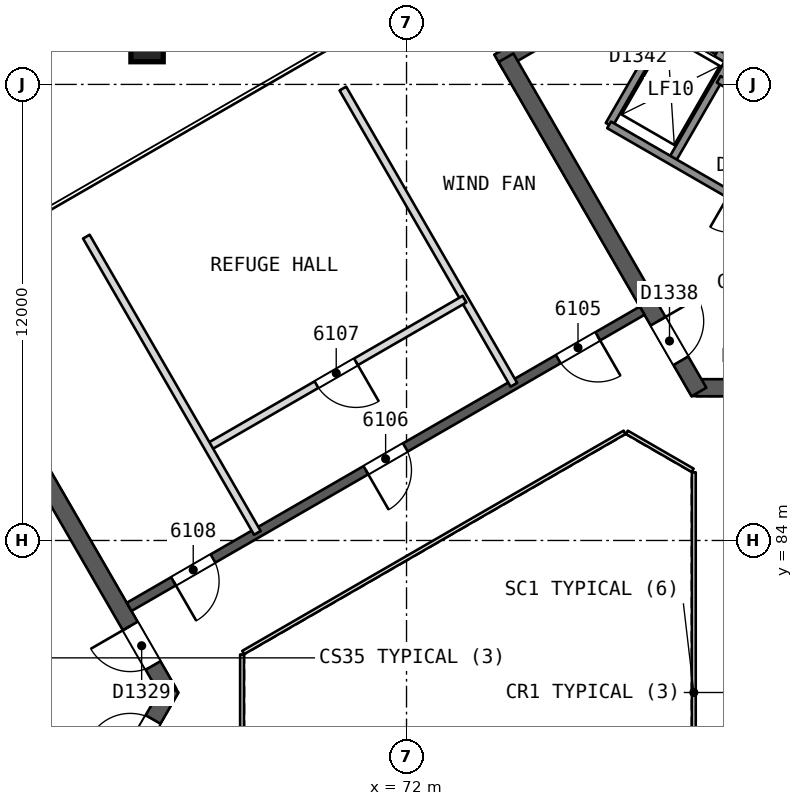
"""IFC4 building model, lengths in metres.
Left out: names, types, materials, properties, quantities, classifications, styles, units other than length and angle.
Written with IfcOpenShell. Run it as: python <this file> out.ifc"""

import sys

from ifc_helpers import new_model, si_unit, direction, frame, frame_2d, origin, origin_2d, place, context, subcontext, project, spatial, rectangle, extrude, element, fill, save


model = new_model("IFC4")
c1 = context("Model", 3, precision=1e-05, world=origin(), true_north=direction((0.0, 1.0)))
c2 = subcontext(c1, "Body", "Model", "MODEL_VIEW")
j1 = project(units=[si_unit("LENGTHUNIT", "METRE"), si_unit("PLANEANGLEUNIT", "RADIAN")], contexts=[c1])
p1 = place(None, origin())
s1 = spatial("IfcSite", under=j1, at=p1, CompositionType="ELEMENT")
p2 = place(p1, origin())
s2 = spatial("IfcBuilding", under=s1, at=p2, CompositionType="ELEMENT")
p3 = place(p2, frame((0.0, 0.0, 246.5)))
s3 = spatial("IfcBuildingStorey", under=s2, at=p3, CompositionType="ELEMENT", Elevation=246.5)
p4 = place(p3, frame((65.74, 80.0, 0.0), z_axis=(0.0, 0.0, 1.0), x_axis=(-0.499991857942, 0.866030104553, 0.0)))
e1 = element("IfcWall", 1, at=p4, inside=s3, PredefinedType="SHEAR", context=c2, shape_type="SweptSolid", body=[
    extrude(rectangle(XDim=10.25, YDim=0.45, at=frame_2d((5.125, 0.0))), origin(), (0.0, 0.0, 1.0), 8.8),
])
p5 = place(p4, frame((0.82, 0.0, 0.0)))
e2 = element("IfcOpeningElement", 2, at=p5, cuts=e1, PredefinedType="OPENING", context=c2, shape_type="SweptSolid", body=[
    extrude(rectangle(XDim=1.2, YDim=2.1, at=frame_2d((0.6, 1.05))), frame((0.0, 0.235, 0.0), z_axis=(0.0, -1.0, 0.0), x_axis=(1.0, 0.0, 0.0)), (0.0, 0.0, 1.0), 0.471),
])
p6 = place(p3, frame((60.728, 71.318, 0.0), z_axis=(0.0, 0.0, 1.0), x_axis=(0.500012416173, 0.866018235185, 0.0)))
e3 = element("IfcWall", 3, at=p6, inside=s3, PredefinedType="SHEAR", context=c2, shape_type="SweptSolid", body=[
    extrude(rectangle(XDim=10.155, YDim=0.45, at=frame_2d((5.078, 0.0))), origin(), (0.0, 0.0, 1.0), 8.8),
])
p7 = place(p6, frame((8.005, 0.0, 0.0)))
e4 = element("IfcOpeningElement", 4, at=p7, cuts=e3, PredefinedType="OPENING", context=c2, shape_type="SweptSolid", body=[
    extrude(rectangle(XDim=1.2, YDim=2.1, at=frame_2d((0.6, 1.05))), frame((0.0, 0.235, 0.0), z_axis=(0.0, -1.0, 0.0), x_axis=(1.0, 0.0, 0.0)), (0.0, 0.0, 1.0), 0.471),
])
p8 = place(p3, frame((79.63, 88.019, 0.0), z_axis=(0.0, 0.0, 1.0), x_axis=(1.0, 0.0, 0.0)))
e5 = element("IfcWall", 5, at=p8, inside=s3, PredefinedType="SHEAR", context=c2, shape_type="SweptSolid", body=[
    extrude(rectangle(XDim=10.25, YDim=0.45, at=frame_2d((5.125, 0.0))), origin(), (0.0, 0.0, 1.0), 8.8),
])
p9 = place(p8, frame((0.82, 0.0, 0.0)))
e6 = element("IfcOpeningElement", 6, at=p9, cuts=e5, PredefinedType="OPENING", context=c2, shape_type="SweptSolid", body=[
    extrude(rectangle(XDim=1.2, YDim=2.1, at=frame_2d((0.6, 1.05))), frame((0.0, 0.235, 0.0), z_axis=(0.0, -1.0, 0.0), x_axis=(1.0, 0.0, 0.0)), (0.0, 0.0, 1.0), 0.471),
])
p10 = place(p3, frame((86.723, 103.69, 0.0), z_axis=(0.0, 0.0, 1.0), x_axis=(-0.866022713978, -0.500004658852, 0.0)))
e7 = element("IfcWall", 7, at=p10, inside=s3, PredefinedType="SHEAR", context=c2, shape_type="SweptSolid", body=[
    extrude(rectangle(XDim=14.203, YDim=0.45, at=frame_2d((7.102, 0.0))), origin(), (0.0, 0.0, 1.0), 8.8),
])
p11 = place(p3, frame((74.617, 96.701, 0.0), z_axis=(0.0, 0.0, 1.0), x_axis=(0.499994385119, -0.866028645513, 0.0)))
e8 = element("IfcWall", 8, at=p11, inside=s3, PredefinedType="SHEAR", context=c2, shape_type="SweptSolid", body=[
    extrude(rectangle(XDim=10.155, YDim=0.45, at=frame_2d((5.077, 0.0))), origin(), (0.0, 0.0, 1.0), 8.8),
])
p12 = place(p11, frame((8.005, 0.0, 0.0)))
e9 = element("IfcOpeningElement", 9, at=p12, cuts=e8, PredefinedType="OPENING", context=c2, shape_type="SweptSolid", body=[
    extrude(rectangle(XDim=1.2, YDim=2.1, at=frame_2d((0.6, 1.05))), frame((0.0, 0.235, 0.0), z_axis=(0.0, -1.0, 0.0), x_axis=(1.0, 0.0, 0.0)), (0.0, 0.0, 1.0), 0.471),
])
p13 = place(p3, frame((78.2, 90.046, 0.0), z_axis=(0.0, 0.0, 1.0), x_axis=(-0.866026492143, -0.499998114903, 0.0)))
e10 = element("IfcWall", 10, at=p13, inside=s3, PredefinedType="SHEAR", context=c2, shape_type="SweptSolid", body=[
    extrude(rectangle(XDim=15.588, YDim=0.25, at=frame_2d((7.794, 0.0))), origin(), (0.0, 0.0, 1.0), 8.4),
])
p14 = place(p13, frame((1.349, 0.0, 0.0)))
e11 = element("IfcOpeningElement", 11, at=p14, cuts=e10, PredefinedType="OPENING", context=c2, shape_type="SweptSolid", body=[
    extrude(rectangle(XDim=1.2, YDim=2.4, at=frame_2d((0.6, 1.2))), frame((0.0, 0.135, 0.0), z_axis=(0.0, -1.0, 0.0), x_axis=(1.0, 0.0, 0.0)), (0.0, 0.0, 1.0), 0.271),
])
p15 = place(p13, frame((7.194, 0.0, 0.0)))
e12 = element("IfcOpeningElement", 12, at=p15, cuts=e10, PredefinedType="OPENING", context=c2, shape_type="SweptSolid", body=[
    extrude(rectangle(XDim=1.2, YDim=2.4, at=frame_2d((0.6, 1.2))), frame((0.0, 0.135, 0.0), z_axis=(0.0, -1.0, 0.0), x_axis=(1.0, 0.0, 0.0)), (0.0, 0.0, 1.0), 0.271),
])
p16 = place(p13, frame((13.04, 0.0, 0.0)))
e13 = element("IfcOpeningElement", 13, at=p16, cuts=e10, PredefinedType="OPENING", context=c2, shape_type="SweptSolid", body=[
    extrude(rectangle(XDim=1.2, YDim=2.4, at=frame_2d((0.6, 1.2))), frame((0.0, 0.135, 0.0), z_axis=(0.0, -1.0, 0.0), x_axis=(1.0, 0.0, 0.0)), (0.0, 0.0, 1.0), 0.271),
])
p17 = place(p3, frame((65.16, 97.042, 0.0), z_axis=(0.010096431238, -0.017474592527, 0.999796329605), x_axis=(-0.500171958309, 0.865690887565, 0.020181657705)))
e14 = element("IfcColumn", 14, at=p17, inside=s3, PredefinedType="COLUMN", context=c2, shape_type="SweptSolid", body=[
    extrude(rectangle(XDim=0.85, YDim=0.85, at=origin_2d()), origin(), (0.0, 0.0, 1.0), 8.802),
])
p18 = place(p3, frame((70.325, 95.892, 0.0), z_axis=(0.0, 0.0, 1.0), x_axis=(0.5000018851, -0.866024315419, 0.0)))
e15 = element("IfcWall", 15, at=p18, inside=s3, PredefinedType="PARTITIONING", context=c2, shape_type="SweptSolid", body=[
    extrude(rectangle(XDim=9.0, YDim=0.2, at=frame_2d((4.5, 0.0))), origin(), (0.0, 0.0, 1.0), 8.4),
])
p19 = place(p3, frame((73.525, 90.349, 0.0), z_axis=(0.0, 0.0, 1.0), x_axis=(-0.866019710441, -0.50000986103, 0.0)))
e16 = element("IfcWall", 16, at=p19, inside=s3, PredefinedType="PARTITIONING", context=c2, shape_type="SweptSolid", body=[
    extrude(rectangle(XDim=7.794, YDim=0.2, at=frame_2d((3.897, 0.0))), origin(), (0.0, 0.0, 1.0), 8.4),
])
p20 = place(p19, frame((3.297, 0.0, 0.0)))
e17 = element("IfcOpeningElement", 17, at=p20, cuts=e16, PredefinedType="OPENING", context=c2, shape_type="SweptSolid", body=[
    extrude(rectangle(XDim=1.2, YDim=2.4, at=frame_2d((0.6, 1.2))), frame((0.0, 0.11, 0.0), z_axis=(0.0, -1.0, 0.0), x_axis=(1.0, 0.0, 0.0)), (0.0, 0.0, 1.0), 0.221),
])
p21 = place(p3, frame((63.575, 91.994, 0.0), z_axis=(0.0, 0.0, 1.0), x_axis=(0.5000018851, -0.866024315419, 0.0)))
e18 = element("IfcWall", 18, at=p21, inside=s3, PredefinedType="PARTITIONING", context=c2, shape_type="SweptSolid", body=[
    extrude(rectangle(XDim=9.0, YDim=0.2, at=frame_2d((4.5, 0.0))), origin(), (0.0, 0.0, 1.0), 8.4),
])
for number, where, z_axis, x_axis in (
    (19, (78.976, 93.986, 0.0), (0.0, 0.0, 1.0), (0.5, 0.866, 0.0)),
    (20, (77.33, 94.936, 0.0), (0.0, 0.0, 1.0), (0.5, 0.866, 0.0)),
):
    element("IfcWall", number, at=place(p3, frame(where, z_axis=z_axis, x_axis=x_axis)), inside=s3, PredefinedType="SOLIDWALL", context=c2, shape_type="SweptSolid", body=[
        extrude(rectangle(XDim=3.05, YDim=0.2, at=frame_2d((1.525, 0.0))), origin(), (0.0, 0.0, 1.0), 8.4),
    ])
p22 = place(p3, frame((86.77, 89.486, 0.0), z_axis=(0.0, 0.0, 1.0), x_axis=(-0.86601811187, 0.500012629753, 0.0)))
e21 = element("IfcWall", 21, at=p22, inside=s3, PredefinedType="SOLIDWALL", context=c2, shape_type="SweptSolid", body=[
    extrude(rectangle(XDim=10.9, YDim=0.2, at=frame_2d((5.45, 0.0))), origin(), (0.0, 0.0, 1.0), 8.4),
])
p23 = place(p22, frame((0.625, 0.0, 0.0)))
e22 = element("IfcOpeningElement", 22, at=p23, cuts=e21, PredefinedType="OPENING", context=c2, shape_type="SweptSolid", body=[
    extrude(rectangle(XDim=1.0, YDim=2.1, at=frame_2d((0.5, 1.05))), frame((0.0, 0.11, 0.0), z_axis=(0.0, -1.0, 0.0), x_axis=(1.0, 0.0, 0.0)), (0.0, 0.0, 1.0), 0.221),
])
p24 = place(p22, frame((2.875, 0.0, 0.0)))
e23 = element("IfcOpeningElement", 23, at=p24, cuts=e21, PredefinedType="OPENING", context=c2, shape_type="SweptSolid", body=[
    extrude(rectangle(XDim=1.0, YDim=2.1, at=frame_2d((0.5, 1.05))), frame((0.0, 0.11, 0.0), z_axis=(0.0, -1.0, 0.0), x_axis=(1.0, 0.0, 0.0)), (0.0, 0.0, 1.0), 0.221),
])
p25 = place(p22, frame((6.25, 0.0, 0.0)))
e24 = element("IfcOpeningElement", 24, at=p25, cuts=e21, PredefinedType="OPENING", context=c2, shape_type="SweptSolid", body=[
    extrude(rectangle(XDim=1.0, YDim=2.1, at=frame_2d((0.5, 1.05))), frame((0.0, 0.11, 0.0), z_axis=(0.0, -1.0, 0.0), x_axis=(1.0, 0.0, 0.0)), (0.0, 0.0, 1.0), 0.221),
])
p26 = place(p3, frame((89.43, 90.814, 0.0), z_axis=(0.0, 0.0, 1.0), x_axis=(-0.866018983788, 0.500011119594, 0.0)))
e25 = element("IfcWall", 25, at=p26, inside=s3, PredefinedType="SOLIDWALL", context=c2, shape_type="SweptSolid", body=[
    extrude(rectangle(XDim=10.64, YDim=0.2, at=frame_2d((5.32, 0.0))), origin(), (0.0, 0.0, 1.0), 8.4),
])
p27 = place(p26, frame((0.37, 0.0, 0.0)))
e26 = element("IfcOpeningElement", 26, at=p27, cuts=e25, PredefinedType="OPENING", context=c2, shape_type="SweptSolid", body=[
    extrude(rectangle(XDim=0.9, YDim=2.1, at=frame_2d((0.45, 1.05))), frame((0.0, 0.11, 0.0), z_axis=(0.0, -1.0, 0.0), x_axis=(1.0, 0.0, 0.0)), (0.0, 0.0, 1.0), 0.221),
])
p28 = place(p3, frame((80.5, 96.627, 0.0), z_axis=(0.0, 0.0, 1.0), x_axis=(-0.86601224135, 0.500022797313, 0.0)))
e27 = element("IfcWall", 27, at=p28, inside=s3, PredefinedType="SOLIDWALL", context=c2, shape_type="SweptSolid", body=[
    extrude(rectangle(XDim=1.9, YDim=0.2, at=frame_2d((0.95, 0.0))), origin(), (0.0, 0.0, 1.0), 8.4),
])
p29 = place(p28, frame((0.4, 0.0, 0.0)))
e28 = element("IfcOpeningElement", 28, at=p29, cuts=e27, PredefinedType="OPENING", context=c2, shape_type="SweptSolid", body=[
    extrude(rectangle(XDim=1.1, YDim=2.1, at=frame_2d((0.55, 1.05))), frame((0.0, 0.11, 0.0), z_axis=(0.0, -1.0, 0.0), x_axis=(1.0, 0.0, 0.0)), (0.0, 0.0, 1.0), 0.221),
])
p30 = place(p3, frame((79.56, 74.206, 0.0), z_axis=(0.0, 0.0, 1.0), x_axis=(0.0, 1.0, 0.0)))
e29 = element("IfcWall", 29, at=p30, inside=s3, PredefinedType="PARTITIONING", context=c2, shape_type="SweptSolid", body=[
    extrude(rectangle(XDim=11.588, YDim=0.1, at=frame_2d((5.794, 0.0))), origin(), (0.0, 0.0, 1.0), 8.4),
])
p31 = place(p3, frame((79.53, 85.846, 0.0), z_axis=(0.0, 0.0, 1.0), x_axis=(-0.866041268327, 0.499972520799, 0.0)))
e30 = element("IfcWall", 30, at=p31, inside=s3, PredefinedType="PARTITIONING", context=c2, shape_type="SweptSolid", body=[
    extrude(rectangle(XDim=2.0, YDim=0.1, at=frame_2d((1.0, 0.0))), origin(), (0.0, 0.0, 1.0), 8.4),
])
p32 = place(p3, frame((77.738, 86.846, 0.0), z_axis=(0.0, 0.0, 1.0), x_axis=(-0.866026658274, -0.499997827154, 0.0)))
e31 = element("IfcWall", 31, at=p32, inside=s3, PredefinedType="PARTITIONING", context=c2, shape_type="SweptSolid", body=[
    extrude(rectangle(XDim=11.588, YDim=0.1, at=frame_2d((5.794, 0.0))), origin(), (0.0, 0.0, 1.0), 8.4),
])
p33 = place(p3, frame((67.672, 81.0, 0.0), z_axis=(0.0, 0.0, 1.0), x_axis=(0.0, -1.0, 0.0)))
e32 = element("IfcWall", 32, at=p33, inside=s3, PredefinedType="PARTITIONING", context=c2, shape_type="SweptSolid", body=[
    extrude(rectangle(XDim=2.0, YDim=0.1, at=frame_2d((1.0, 0.0))), origin(), (0.0, 0.0, 1.0), 8.4),
])
p34 = place(p14, origin())
e33 = element("IfcDoor", 33, at=p34, inside=s3, OperationType="SINGLE_SWING_LEFT", PredefinedType="NOTDEFINED", context=c2, shape_type="SweptSolid", body=[
    extrude(rectangle(XDim=1.2, YDim=2.4, at=frame_2d((0.6, 1.2))), frame((0.0, 0.025, 0.0), z_axis=(0.0, -1.0, 0.0), x_axis=(1.0, 0.0, 0.0)), (0.0, 0.0, 1.0), 0.05),
])
fill(e11, e33)
p35 = place(p15, origin())
e34 = element("IfcDoor", 34, at=p35, inside=s3, OperationType="SINGLE_SWING_RIGHT", PredefinedType="NOTDEFINED", context=c2, shape_type="SweptSolid", body=[
    extrude(rectangle(XDim=1.2, YDim=2.4, at=frame_2d((0.6, 1.2))), frame((0.0, 0.025, 0.0), z_axis=(0.0, -1.0, 0.0), x_axis=(1.0, 0.0, 0.0)), (0.0, 0.0, 1.0), 0.05),
])
fill(e12, e34)
p36 = place(p20, origin())
e35 = element("IfcDoor", 35, at=p36, inside=s3, OperationType="SINGLE_SWING_LEFT", PredefinedType="NOTDEFINED", context=c2, shape_type="SweptSolid", body=[
    extrude(rectangle(XDim=1.2, YDim=2.4, at=frame_2d((0.6, 1.2))), frame((0.0, 0.025, 0.0), z_axis=(0.0, -1.0, 0.0), x_axis=(1.0, 0.0, 0.0)), (0.0, 0.0, 1.0), 0.05),
])
fill(e17, e35)
p37 = place(p16, origin())
e36 = element("IfcDoor", 36, at=p37, inside=s3, OperationType="SINGLE_SWING_RIGHT", PredefinedType="NOTDEFINED", context=c2, shape_type="SweptSolid", body=[
    extrude(rectangle(XDim=1.2, YDim=2.4, at=frame_2d((0.6, 1.2))), frame((0.0, 0.025, 0.0), z_axis=(0.0, -1.0, 0.0), x_axis=(1.0, 0.0, 0.0)), (0.0, 0.0, 1.0), 0.05),
])
fill(e13, e36)
p38 = place(p5, origin())
e37 = element("IfcDoor", 37, at=p38, inside=s3, OperationType="SINGLE_SWING_RIGHT", PredefinedType="NOTDEFINED", context=c2, shape_type="SweptSolid", body=[
    extrude(rectangle(XDim=1.2, YDim=2.1, at=frame_2d((0.6, 1.05))), frame((0.0, 0.025, 0.0), z_axis=(0.0, -1.0, 0.0), x_axis=(1.0, 0.0, 0.0)), (0.0, 0.0, 1.0), 0.05),
])
fill(e2, e37)
p39 = place(p7, origin())
e38 = element("IfcDoor", 38, at=p39, inside=s3, OperationType="SINGLE_SWING_LEFT", PredefinedType="NOTDEFINED", context=c2, shape_type="SweptSolid", body=[
    extrude(rectangle(XDim=1.2, YDim=2.1, at=frame_2d((0.6, 1.05))), frame((0.0, 0.025, 0.0), z_axis=(0.0, -1.0, 0.0), x_axis=(1.0, 0.0, 0.0)), (0.0, 0.0, 1.0), 0.05),
])
fill(e4, e38)
p40 = place(p12, origin())
e39 = element("IfcDoor", 39, at=p40, inside=s3, OperationType="SINGLE_SWING_LEFT", PredefinedType="NOTDEFINED", context=c2, shape_type="SweptSolid", body=[
    extrude(rectangle(XDim=1.2, YDim=2.1, at=frame_2d((0.6, 1.05))), frame((0.0, 0.025, 0.0), z_axis=(0.0, -1.0, 0.0), x_axis=(1.0, 0.0, 0.0)), (0.0, 0.0, 1.0), 0.05),
])
fill(e9, e39)
p41 = place(p29, origin())
e40 = element("IfcDoor", 40, at=p41, inside=s3, OperationType="SLIDING_TO_RIGHT", PredefinedType="NOTDEFINED", context=c2, shape_type="SweptSolid", body=[
    extrude(rectangle(XDim=1.1, YDim=2.1, at=frame_2d((0.55, 1.05))), frame((0.0, 0.025, 0.0), z_axis=(0.0, -1.0, 0.0), x_axis=(1.0, 0.0, 0.0)), (0.0, 0.0, 1.0), 0.05),
])
fill(e28, e40)
save(model, sys.argv[1])
